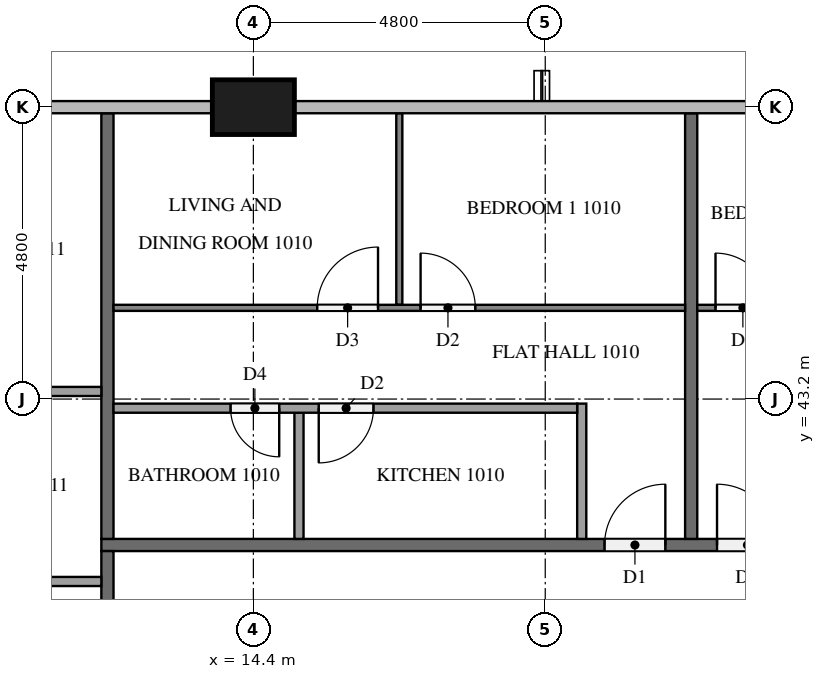
"""IFC4 building model, lengths in metres.
Left out: names, types, materials, properties, quantities, classifications, styles, units other than length and angle.
Written with IfcOpenShell. Run it as: python <this file> out.ifc"""

import sys

from ifc_helpers import new_model, si_unit, direction, frame, frame_2d, origin, origin_2d, place, context, subcontext, project, spatial, rectangle, extrude, element, fill, save


model = new_model("IFC4")
c1 = context("Model", 3, precision=1e-05, world=origin(), true_north=direction((0.0, 1.0)))
c2 = subcontext(c1, "Body", "Model", "MODEL_VIEW")
j1 = project(units=[si_unit("LENGTHUNIT", "METRE"), si_unit("PLANEANGLEUNIT", "RADIAN")], contexts=[c1])
p1 = place(None, origin())
s1 = spatial("IfcSite", under=j1, at=p1, CompositionType="ELEMENT")
p2 = place(p1, origin())
s2 = spatial("IfcBuilding", under=s1, at=p2, CompositionType="ELEMENT")
p3 = place(p2, frame((0.0, 0.0, 43.4)))
s3 = spatial("IfcBuildingStorey", under=s2, at=p3, CompositionType="ELEMENT", Elevation=43.4)
p4 = place(p3, frame((14.4, 48.0, 0.0), z_axis=(0.0, 0.0, 1.0), x_axis=(1.0, 0.0, 0.0)))
e1 = element("IfcColumn", 1, at=p4, inside=s3, PredefinedType="COLUMN", context=c2, shape_type="SweptSolid", body=[
    extrude(rectangle(XDim=1.35, YDim=0.9, at=origin_2d()), origin(), (0.0, 0.0, 1.0), 3.2),
])
p5 = place(p3, frame((11.9, 40.8, 0.0), z_axis=(0.0, 0.0, 1.0), x_axis=(1.0, 0.0, 0.0)))
e2 = element("IfcWall", 2, at=p5, inside=s3, PredefinedType="PARTITIONING", context=c2, shape_type="SweptSolid", body=[
    extrude(rectangle(XDim=38.6, YDim=0.2, at=frame_2d((19.3, 0.0))), origin(), (0.0, 0.0, 1.0), 3.2),
])
p6 = place(p5, frame((22.125, 0.0, 0.0)))
e3 = element("IfcOpeningElement", 3, at=p6, cuts=e2, PredefinedType="OPENING", context=c2, shape_type="SweptSolid", body=[
    extrude(rectangle(XDim=1.0, YDim=2.1, at=frame_2d((0.5, 1.05))), frame((0.0, 0.11, 0.0), z_axis=(0.0, -1.0, 0.0), x_axis=(1.0, 0.0, 0.0)), (0.0, 0.0, 1.0), 0.22),
])
p7 = place(p5, frame((10.125, 0.0, 0.0)))
e4 = element("IfcOpeningElement", 4, at=p7, cuts=e2, PredefinedType="OPENING", context=c2, shape_type="SweptSolid", body=[
    extrude(rectangle(XDim=1.0, YDim=2.1, at=frame_2d((0.5, 1.05))), frame((0.0, 0.11, 0.0), z_axis=(0.0, -1.0, 0.0), x_axis=(1.0, 0.0, 0.0)), (0.0, 0.0, 1.0), 0.22),
])
p8 = place(p5, frame((8.275, 0.0, 0.0)))
e5 = element("IfcOpeningElement", 5, at=p8, cuts=e2, PredefinedType="OPENING", context=c2, shape_type="SweptSolid", body=[
    extrude(rectangle(XDim=1.0, YDim=2.1, at=frame_2d((0.5, 1.05))), frame((0.0, 0.11, 0.0), z_axis=(0.0, -1.0, 0.0), x_axis=(1.0, 0.0, 0.0)), (0.0, 0.0, 1.0), 0.22),
])
p9 = place(p3, frame((12.0, 12.1, 0.0), z_axis=(0.0, 0.0, 1.0), x_axis=(0.0, 1.0, 0.0)))
e6 = element("IfcWall", 6, at=p9, inside=s3, PredefinedType="PARTITIONING", context=c2, shape_type="SweptSolid", body=[
    extrude(rectangle(XDim=28.6, YDim=0.2, at=frame_2d((14.3, 0.0))), origin(), (0.0, 0.0, 1.0), 3.2),
])
p10 = place(p9, frame((26.725, 0.0, 0.0)))
e7 = element("IfcOpeningElement", 7, at=p10, cuts=e6, PredefinedType="OPENING", context=c2, shape_type="SweptSolid", body=[
    extrude(rectangle(XDim=1.0, YDim=2.1, at=frame_2d((0.5, 1.05))), frame((0.0, 0.11, 0.0), z_axis=(0.0, -1.0, 0.0), x_axis=(1.0, 0.0, 0.0)), (0.0, 0.0, 1.0), 0.22),
])
p11 = place(p9, frame((17.125, 0.0, 0.0)))
e8 = element("IfcOpeningElement", 8, at=p11, cuts=e6, PredefinedType="OPENING", context=c2, shape_type="SweptSolid", body=[
    extrude(rectangle(XDim=1.0, YDim=2.1, at=frame_2d((0.5, 1.05))), frame((0.0, 0.11, 0.0), z_axis=(0.0, -1.0, 0.0), x_axis=(1.0, 0.0, 0.0)), (0.0, 0.0, 1.0), 0.22),
])
p12 = place(p9, frame((15.275, 0.0, 0.0)))
e9 = element("IfcOpeningElement", 9, at=p12, cuts=e6, PredefinedType="OPENING", context=c2, shape_type="SweptSolid", body=[
    extrude(rectangle(XDim=1.0, YDim=2.1, at=frame_2d((0.5, 1.05))), frame((0.0, 0.11, 0.0), z_axis=(0.0, -1.0, 0.0), x_axis=(1.0, 0.0, 0.0)), (0.0, 0.0, 1.0), 0.22),
])
p13 = place(p9, frame((5.675, 0.0, 0.0)))
e10 = element("IfcOpeningElement", 10, at=p13, cuts=e6, PredefinedType="OPENING", context=c2, shape_type="SweptSolid", body=[
    extrude(rectangle(XDim=1.0, YDim=2.1, at=frame_2d((0.5, 1.05))), frame((0.0, 0.11, 0.0), z_axis=(0.0, -1.0, 0.0), x_axis=(1.0, 0.0, 0.0)), (0.0, 0.0, 1.0), 0.22),
])
for number, where, z_axis, x_axis in (
    (11, (21.6, 47.9, 0.0), (0.0, 0.0, 1.0), (0.0, -1.0, 0.0)),
    (12, (12.0, 47.9, 0.0), (0.0, 0.0, 1.0), (0.0, -1.0, 0.0)),
):
    element("IfcWall", number, at=place(p3, frame(where, z_axis=z_axis, x_axis=x_axis)), inside=s3, PredefinedType="PARTITIONING", context=c2, shape_type="SweptSolid", body=[
        extrude(rectangle(XDim=7.0, YDim=0.2, at=frame_2d((3.5, 0.0))), origin(), (0.0, 0.0, 1.0), 3.2),
    ])
p14 = place(p3, frame((21.7, 44.7, 0.0), z_axis=(0.0, 0.0, 1.0), x_axis=(1.0, 0.0, 0.0)))
e13 = element("IfcWall", 13, at=p14, inside=s3, PredefinedType="PARTITIONING", context=c2, shape_type="SweptSolid", body=[
    extrude(rectangle(XDim=11.8, YDim=0.1, at=frame_2d((5.9, 0.0))), origin(), (0.0, 0.0, 1.0), 3.2),
])
p15 = place(p14, frame((0.3, 0.0, 0.0)))
e14 = element("IfcOpeningElement", 14, at=p15, cuts=e13, PredefinedType="OPENING", context=c2, shape_type="SweptSolid", body=[
    extrude(rectangle(XDim=0.9, YDim=2.1, at=frame_2d((0.45, 1.05))), frame((0.0, 0.06, 0.0), z_axis=(0.0, -1.0, 0.0), x_axis=(1.0, 0.0, 0.0)), (0.0, 0.0, 1.0), 0.12),
])
p16 = place(p14, frame((10.5, 0.0, 0.0)))
e15 = element("IfcOpeningElement", 15, at=p16, cuts=e13, PredefinedType="OPENING", context=c2, shape_type="SweptSolid", body=[
    extrude(rectangle(XDim=1.0, YDim=2.1, at=frame_2d((0.5, 1.05))), frame((0.0, 0.06, 0.0), z_axis=(0.0, -1.0, 0.0), x_axis=(1.0, 0.0, 0.0)), (0.0, 0.0, 1.0), 0.12),
])
p17 = place(p3, frame((16.8, 44.75, 0.0), z_axis=(0.0, 0.0, 1.0), x_axis=(0.0, 1.0, 0.0)))
e16 = element("IfcWall", 16, at=p17, inside=s3, PredefinedType="PARTITIONING", context=c2, shape_type="SweptSolid", body=[
    extrude(rectangle(XDim=3.15, YDim=0.1, at=frame_2d((1.575, 0.0))), origin(), (0.0, 0.0, 1.0), 3.2),
])
p18 = place(p3, frame((12.1, 44.7, 0.0), z_axis=(0.0, 0.0, 1.0), x_axis=(1.0, 0.0, 0.0)))
e17 = element("IfcWall", 17, at=p18, inside=s3, PredefinedType="PARTITIONING", context=c2, shape_type="SweptSolid", body=[
    extrude(rectangle(XDim=9.4, YDim=0.1, at=frame_2d((4.7, 0.0))), origin(), (0.0, 0.0, 1.0), 3.2),
])
p19 = place(p18, frame((5.05, 0.0, 0.0)))
e18 = element("IfcOpeningElement", 18, at=p19, cuts=e17, PredefinedType="OPENING", context=c2, shape_type="SweptSolid", body=[
    extrude(rectangle(XDim=0.9, YDim=2.1, at=frame_2d((0.45, 1.05))), frame((0.0, 0.06, 0.0), z_axis=(0.0, -1.0, 0.0), x_axis=(1.0, 0.0, 0.0)), (0.0, 0.0, 1.0), 0.12),
])
p20 = place(p18, frame((3.35, 0.0, 0.0)))
e19 = element("IfcOpeningElement", 19, at=p20, cuts=e17, PredefinedType="OPENING", context=c2, shape_type="SweptSolid", body=[
    extrude(rectangle(XDim=1.0, YDim=2.1, at=frame_2d((0.5, 1.05))), frame((0.0, 0.06, 0.0), z_axis=(0.0, -1.0, 0.0), x_axis=(1.0, 0.0, 0.0)), (0.0, 0.0, 1.0), 0.12),
])
p21 = place(p3, frame((15.15, 40.9, 0.0), z_axis=(0.0, 0.0, 1.0), x_axis=(0.0, 1.0, 0.0)))
e20 = element("IfcWall", 20, at=p21, inside=s3, PredefinedType="PARTITIONING", context=c2, shape_type="SweptSolid", body=[
    extrude(rectangle(XDim=2.075, YDim=0.15, at=frame_2d((1.038, 0.0))), origin(), (0.0, 0.0, 1.0), 3.2),
])
p22 = place(p3, frame((19.8, 40.9, 0.0), z_axis=(0.0, 0.0, 1.0), x_axis=(0.0, 1.0, 0.0)))
e21 = element("IfcWall", 21, at=p22, inside=s3, PredefinedType="PARTITIONING", context=c2, shape_type="SweptSolid", body=[
    extrude(rectangle(XDim=2.225, YDim=0.15, at=frame_2d((1.113, 0.0))), origin(), (0.0, 0.0, 1.0), 3.2),
])
p23 = place(p3, frame((19.725, 43.05, 0.0), z_axis=(0.0, 0.0, 1.0), x_axis=(-1.0, 0.0, 0.0)))
e22 = element("IfcWall", 22, at=p23, inside=s3, PredefinedType="PARTITIONING", context=c2, shape_type="SweptSolid", body=[
    extrude(rectangle(XDim=7.625, YDim=0.15, at=frame_2d((3.812, 0.0))), origin(), (0.0, 0.0, 1.0), 3.2),
])
p24 = place(p23, frame((3.35, 0.0, 0.0)))
e23 = element("IfcOpeningElement", 23, at=p24, cuts=e22, PredefinedType="OPENING", context=c2, shape_type="SweptSolid", body=[
    extrude(rectangle(XDim=0.9, YDim=2.1, at=frame_2d((0.45, 1.05))), frame((0.0, 0.085, 0.0), z_axis=(0.0, -1.0, 0.0), x_axis=(1.0, 0.0, 0.0)), (0.0, 0.0, 1.0), 0.17),
])
p25 = place(p23, frame((4.9, 0.0, 0.0)))
e24 = element("IfcOpeningElement", 24, at=p25, cuts=e22, PredefinedType="OPENING", context=c2, shape_type="SweptSolid", body=[
    extrude(rectangle(XDim=0.8, YDim=2.1, at=frame_2d((0.4, 1.05))), frame((0.0, 0.085, 0.0), z_axis=(0.0, -1.0, 0.0), x_axis=(1.0, 0.0, 0.0)), (0.0, 0.0, 1.0), 0.17),
])
p26 = place(p3, frame((11.9, 43.325, 0.0), z_axis=(0.0, 0.0, 1.0), x_axis=(-1.0, 0.0, 0.0)))
e25 = element("IfcWall", 25, at=p26, inside=s3, PredefinedType="PARTITIONING", context=c2, shape_type="SweptSolid", body=[
    extrude(rectangle(XDim=3.275, YDim=0.15, at=frame_2d((1.637, 0.0))), origin(), (0.0, 0.0, 1.0), 3.2),
])
p27 = place(p3, frame((11.9, 40.2, 0.0), z_axis=(0.0, 0.0, 1.0), x_axis=(-1.0, 0.0, 0.0)))
e26 = element("IfcWall", 26, at=p27, inside=s3, PredefinedType="PARTITIONING", context=c2, shape_type="SweptSolid", body=[
    extrude(rectangle(XDim=3.425, YDim=0.15, at=frame_2d((1.712, 0.0))), origin(), (0.0, 0.0, 1.0), 3.2),
])
p28 = place(p7, origin())
e27 = element("IfcDoor", 27, at=p28, inside=s3, OperationType="SINGLE_SWING_LEFT", PredefinedType="DOOR", context=c2, shape_type="SweptSolid", body=[
    extrude(rectangle(XDim=1.0, YDim=2.1, at=frame_2d((0.5, 1.05))), frame((0.0, 0.025, 0.0), z_axis=(0.0, -1.0, 0.0), x_axis=(1.0, 0.0, 0.0)), (0.0, 0.0, 1.0), 0.05),
])
fill(e4, e27)
p29 = place(p8, origin())
e28 = element("IfcDoor", 28, at=p29, inside=s3, OperationType="SINGLE_SWING_RIGHT", PredefinedType="DOOR", context=c2, shape_type="SweptSolid", body=[
    extrude(rectangle(XDim=1.0, YDim=2.1, at=frame_2d((0.5, 1.05))), frame((0.0, 0.025, 0.0), z_axis=(0.0, -1.0, 0.0), x_axis=(1.0, 0.0, 0.0)), (0.0, 0.0, 1.0), 0.05),
])
fill(e5, e28)
p30 = place(p15, origin())
e29 = element("IfcDoor", 29, at=p30, inside=s3, OperationType="SINGLE_SWING_LEFT", PredefinedType="DOOR", context=c2, shape_type="SweptSolid", body=[
    extrude(rectangle(XDim=0.9, YDim=2.1, at=frame_2d((0.45, 1.05))), frame((0.0, 0.025, 0.0), z_axis=(0.0, -1.0, 0.0), x_axis=(1.0, 0.0, 0.0)), (0.0, 0.0, 1.0), 0.05),
])
fill(e14, e29)
p31 = place(p19, origin())
e30 = element("IfcDoor", 30, at=p31, inside=s3, OperationType="SINGLE_SWING_LEFT", PredefinedType="DOOR", context=c2, shape_type="SweptSolid", body=[
    extrude(rectangle(XDim=0.9, YDim=2.1, at=frame_2d((0.45, 1.05))), frame((0.0, 0.025, 0.0), z_axis=(0.0, -1.0, 0.0), x_axis=(1.0, 0.0, 0.0)), (0.0, 0.0, 1.0), 0.05),
])
fill(e18, e30)
p32 = place(p20, origin())
e31 = element("IfcDoor", 31, at=p32, inside=s3, OperationType="SINGLE_SWING_RIGHT", PredefinedType="DOOR", context=c2, shape_type="SweptSolid", body=[
    extrude(rectangle(XDim=1.0, YDim=2.1, at=frame_2d((0.5, 1.05))), frame((0.0, 0.025, 0.0), z_axis=(0.0, -1.0, 0.0), x_axis=(1.0, 0.0, 0.0)), (0.0, 0.0, 1.0), 0.05),
])
fill(e19, e31)
p33 = place(p24, origin())
e32 = element("IfcDoor", 32, at=p33, inside=s3, OperationType="SINGLE_SWING_RIGHT", PredefinedType="DOOR", context=c2, shape_type="SweptSolid", body=[
    extrude(rectangle(XDim=0.9, YDim=2.1, at=frame_2d((0.45, 1.05))), frame((0.0, 0.025, 0.0), z_axis=(0.0, -1.0, 0.0), x_axis=(1.0, 0.0, 0.0)), (0.0, 0.0, 1.0), 0.05),
])
fill(e23, e32)
p34 = place(p25, origin())
e33 = element("IfcDoor", 33, at=p34, inside=s3, OperationType="SINGLE_SWING_LEFT", PredefinedType="DOOR", context=c2, shape_type="SweptSolid", body=[
    extrude(rectangle(XDim=0.8, YDim=2.1, at=frame_2d((0.4, 1.05))), frame((0.0, 0.025, 0.0), z_axis=(0.0, -1.0, 0.0), x_axis=(1.0, 0.0, 0.0)), (0.0, 0.0, 1.0), 0.05),
])
fill(e24, e33)
save(model, sys.argv[1])
